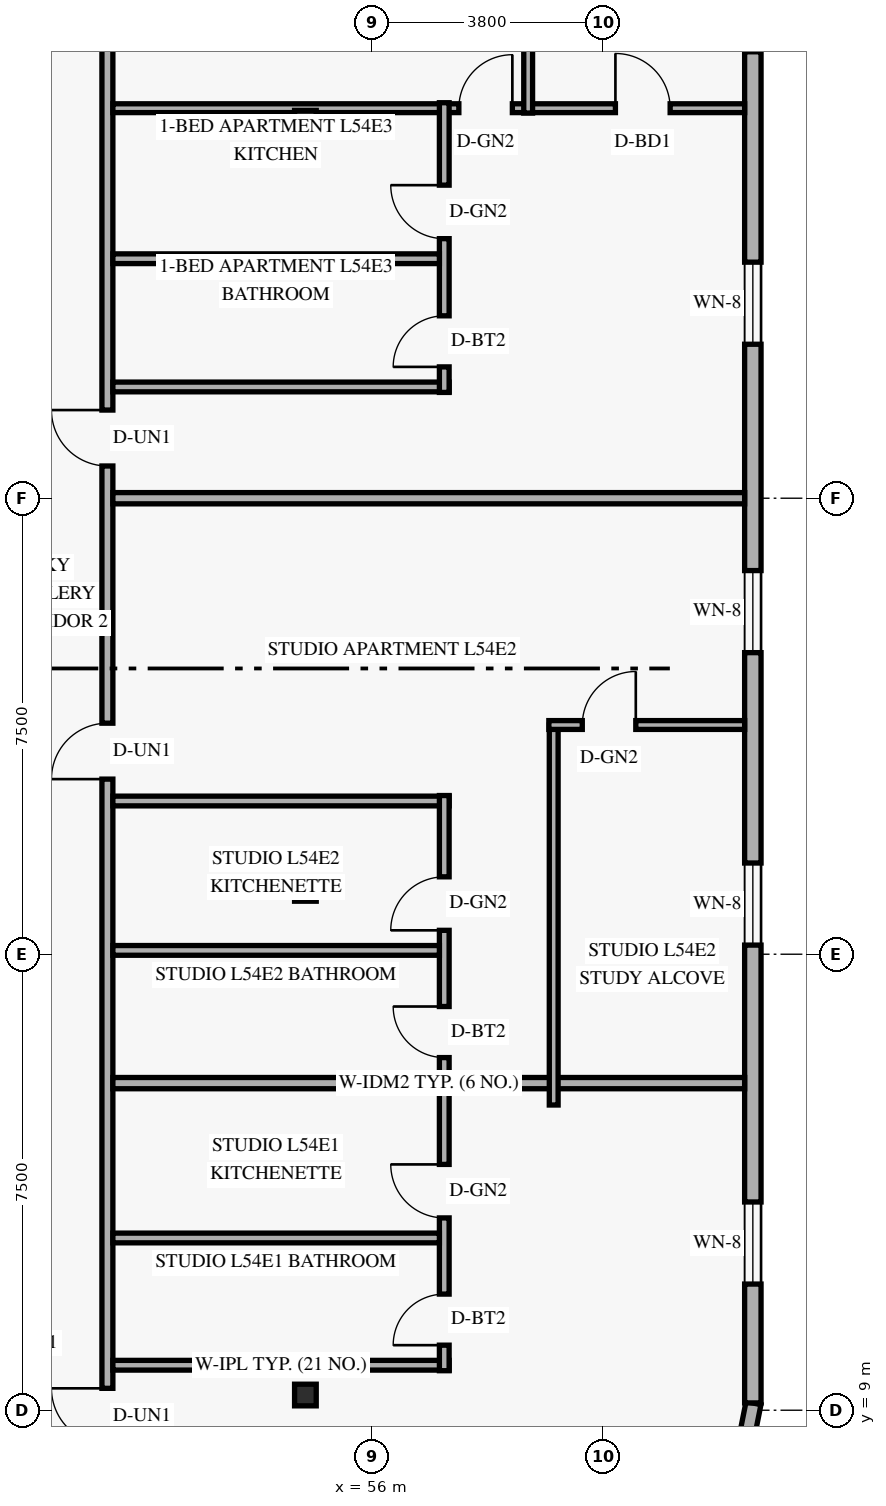
"""IFC4 building model, lengths in metres.
Left out: names, types, materials, properties, quantities, classifications, styles, units other than length and angle.
Written with IfcOpenShell. Run it as: python <this file> out.ifc"""

import sys

from ifc_helpers import new_model, si_unit, direction, frame, frame_2d, origin, origin_2d, place, context, subcontext, project, spatial, rectangle, hollow_rectangle, extrude, element, fill, save


model = new_model("IFC4")
c1 = context("Model", 3, precision=1e-05, world=origin(), true_north=direction((0.0, 1.0)))
c2 = subcontext(c1, "Body", "Model", "MODEL_VIEW")
j1 = project(units=[si_unit("LENGTHUNIT", "METRE"), si_unit("PLANEANGLEUNIT", "RADIAN")], contexts=[c1])
p1 = place(None, origin())
s1 = spatial("IfcSite", under=j1, at=p1, CompositionType="ELEMENT")
p2 = place(p1, origin())
s2 = spatial("IfcBuilding", under=s1, at=p2, CompositionType="ELEMENT")
p3 = place(p2, frame((0.0, 0.0, 209.4)))
s3 = spatial("IfcBuildingStorey", under=s2, at=p3, CompositionType="ELEMENT", Elevation=209.4)
for number, where, z_axis, x_axis in (
    (1, (54.802, 9.25, 0.0), (0.058, 0.0, 0.998), (0.0, 1.0, 0.0)),
    (2, (54.802, 17.55, 0.0), (0.058, 0.0, 0.998), (0.0, 1.0, 0.0)),
    (3, (54.802, 30.2, 0.0), (0.058, 0.0, 0.998), (0.0, 1.0, 0.0)),
):
    element("IfcColumn", number, at=place(p3, frame(where, z_axis=z_axis, x_axis=x_axis)), inside=s3, PredefinedType="COLUMN", context=c2, shape_type="SweptSolid", body=[
        extrude(hollow_rectangle(XDim=0.356, YDim=0.356, WallThickness=0.016, at=origin_2d()), origin(), (0.0, 0.0, 1.0), 3.606),
    ])
p4 = place(p3, frame((62.005, 7.754, 0.0), z_axis=(0.0, 0.0, 1.0), x_axis=(0.195135625965, 0.9807762678, 0.0)))
e4 = element("IfcWall", 4, at=p4, inside=s3, PredefinedType="SOLIDWALL", context=c2, shape_type="SweptSolid", body=[
    extrude(rectangle(XDim=1.389, YDim=0.25, at=frame_2d((0.694, 0.0))), origin(), (0.0, 0.0, 1.0), 3.36),
])
p5 = place(p3, frame((62.265, 9.12, 0.0), z_axis=(0.0, 0.0, 1.0), x_axis=(0.0, 1.0, 0.0)))
e5 = element("IfcWall", 5, at=p5, inside=s3, PredefinedType="SOLIDWALL", context=c2, shape_type="SweptSolid", body=[
    extrude(rectangle(XDim=29.76, YDim=0.27, at=frame_2d((14.88, 0.0))), origin(), (0.0, 0.0, 1.0), 3.36),
])
p6 = place(p5, frame((1.955, 0.0, 0.85)))
e6 = element("IfcOpeningElement", 6, at=p6, cuts=e5, PredefinedType="OPENING", context=c2, shape_type="SweptSolid", body=[
    extrude(rectangle(XDim=1.35, YDim=1.55, at=frame_2d((0.675, 0.775))), frame((0.0, 0.145, 0.0), z_axis=(0.0, -1.0, 0.0), x_axis=(1.0, 0.0, 0.0)), (0.0, 0.0, 1.0), 0.29),
])
p7 = place(p5, frame((7.53, 0.0, 0.85)))
e7 = element("IfcOpeningElement", 7, at=p7, cuts=e5, PredefinedType="OPENING", context=c2, shape_type="SweptSolid", body=[
    extrude(rectangle(XDim=1.35, YDim=1.55, at=frame_2d((0.675, 0.775))), frame((0.0, 0.145, 0.0), z_axis=(0.0, -1.0, 0.0), x_axis=(1.0, 0.0, 0.0)), (0.0, 0.0, 1.0), 0.29),
])
p8 = place(p5, frame((12.34, 0.0, 0.85)))
e8 = element("IfcOpeningElement", 8, at=p8, cuts=e5, PredefinedType="OPENING", context=c2, shape_type="SweptSolid", body=[
    extrude(rectangle(XDim=1.35, YDim=1.55, at=frame_2d((0.675, 0.775))), frame((0.0, 0.145, 0.0), z_axis=(0.0, -1.0, 0.0), x_axis=(1.0, 0.0, 0.0)), (0.0, 0.0, 1.0), 0.29),
])
p9 = place(p5, frame((17.412, 0.0, 0.85)))
e9 = element("IfcOpeningElement", 9, at=p9, cuts=e5, PredefinedType="OPENING", context=c2, shape_type="SweptSolid", body=[
    extrude(rectangle(XDim=1.35, YDim=1.55, at=frame_2d((0.675, 0.775))), frame((0.0, 0.145, 0.0), z_axis=(0.0, -1.0, 0.0), x_axis=(1.0, 0.0, 0.0)), (0.0, 0.0, 1.0), 0.29),
])
p10 = place(p5, frame((22.222, 0.0, 0.85)))
e10 = element("IfcOpeningElement", 10, at=p10, cuts=e5, PredefinedType="OPENING", context=c2, shape_type="SweptSolid", body=[
    extrude(rectangle(XDim=1.35, YDim=1.55, at=frame_2d((0.675, 0.775))), frame((0.0, 0.145, 0.0), z_axis=(0.0, -1.0, 0.0), x_axis=(1.0, 0.0, 0.0)), (0.0, 0.0, 1.0), 0.29),
])
p11 = place(p5, frame((26.455, 0.0, 0.85)))
e11 = element("IfcOpeningElement", 11, at=p11, cuts=e5, PredefinedType="OPENING", context=c2, shape_type="SweptSolid", body=[
    extrude(rectangle(XDim=1.35, YDim=1.55, at=frame_2d((0.675, 0.775))), frame((0.0, 0.145, 0.0), z_axis=(0.0, -1.0, 0.0), x_axis=(1.0, 0.0, 0.0)), (0.0, 0.0, 1.0), 0.29),
])
p12 = place(p3, frame((51.65, 5.77, 0.0), z_axis=(0.0, 0.0, 1.0), x_axis=(0.0, 1.0, 0.0)))
e12 = element("IfcWall", 12, at=p12, inside=s3, PredefinedType="STANDARD", context=c2, shape_type="SweptSolid", body=[
    extrude(rectangle(XDim=36.46, YDim=0.18, at=frame_2d((18.23, 0.0))), origin(), (0.0, 0.0, 1.0), 2.803),
])
p13 = place(p12, frame((2.67, 0.0, 0.0)))
e13 = element("IfcOpeningElement", 13, at=p13, cuts=e12, PredefinedType="OPENING", context=c2, shape_type="SweptSolid", body=[
    extrude(rectangle(XDim=0.92, YDim=2.15, at=frame_2d((0.46, 1.075))), frame((0.0, 0.1, 0.0), z_axis=(0.0, -1.0, 0.0), x_axis=(1.0, 0.0, 0.0)), (0.0, 0.0, 1.0), 0.2),
])
p14 = place(p12, frame((13.61, 0.0, 0.0)))
e14 = element("IfcOpeningElement", 14, at=p14, cuts=e12, PredefinedType="OPENING", context=c2, shape_type="SweptSolid", body=[
    extrude(rectangle(XDim=0.92, YDim=2.15, at=frame_2d((0.46, 1.075))), frame((0.0, 0.1, 0.0), z_axis=(0.0, -1.0, 0.0), x_axis=(1.0, 0.0, 0.0)), (0.0, 0.0, 1.0), 0.2),
])
p15 = place(p12, frame((18.76, 0.0, 0.0)))
e15 = element("IfcOpeningElement", 15, at=p15, cuts=e12, PredefinedType="OPENING", context=c2, shape_type="SweptSolid", body=[
    extrude(rectangle(XDim=0.92, YDim=2.15, at=frame_2d((0.46, 1.075))), frame((0.0, 0.1, 0.0), z_axis=(0.0, -1.0, 0.0), x_axis=(1.0, 0.0, 0.0)), (0.0, 0.0, 1.0), 0.2),
])
p16 = place(p12, frame((32.75, 0.0, 0.0)))
e16 = element("IfcOpeningElement", 16, at=p16, cuts=e12, PredefinedType="OPENING", context=c2, shape_type="SweptSolid", body=[
    extrude(rectangle(XDim=0.92, YDim=2.15, at=frame_2d((0.46, 1.075))), frame((0.0, 0.1, 0.0), z_axis=(0.0, -1.0, 0.0), x_axis=(1.0, 0.0, 0.0)), (0.0, 0.0, 1.0), 0.2),
])
p17 = place(p3, frame((51.74, 9.74, 0.0), z_axis=(0.0, 0.0, 1.0), x_axis=(1.0, 0.0, 0.0)))
e17 = element("IfcWall", 17, at=p17, inside=s3, PredefinedType="PLUMBINGWALL", context=c2, shape_type="SweptSolid", body=[
    extrude(rectangle(XDim=5.53, YDim=0.16, at=frame_2d((2.765, 0.0))), origin(), (0.0, 0.0, 1.0), 2.879),
])
p18 = place(p3, frame((57.19, 9.65, 0.0), z_axis=(0.0, 0.0, 1.0), x_axis=(0.0, 1.0, 0.0)))
e18 = element("IfcWall", 18, at=p18, inside=s3, PredefinedType="PLUMBINGWALL", context=c2, shape_type="SweptSolid", body=[
    extrude(rectangle(XDim=4.73, YDim=0.16, at=frame_2d((2.365, 0.0))), origin(), (0.0, 0.0, 1.0), 3.36),
])
p19 = place(p18, frame((0.42, 0.0, 0.0)))
e19 = element("IfcOpeningElement", 19, at=p19, cuts=e18, PredefinedType="OPENING", context=c2, shape_type="SweptSolid", body=[
    extrude(rectangle(XDim=0.84, YDim=2.12, at=frame_2d((0.42, 1.06))), frame((0.0, 0.09, 0.0), z_axis=(0.0, -1.0, 0.0), x_axis=(1.0, 0.0, 0.0)), (0.0, 0.0, 1.0), 0.18),
])
p20 = place(p18, frame((2.513, 0.0, 0.0)))
e20 = element("IfcOpeningElement", 20, at=p20, cuts=e18, PredefinedType="OPENING", context=c2, shape_type="SweptSolid", body=[
    extrude(rectangle(XDim=0.88, YDim=2.12, at=frame_2d((0.44, 1.06))), frame((0.0, 0.09, 0.0), z_axis=(0.0, -1.0, 0.0), x_axis=(1.0, 0.0, 0.0)), (0.0, 0.0, 1.0), 0.18),
])
p21 = place(p3, frame((51.74, 11.833, 0.0), z_axis=(0.0, 0.0, 1.0), x_axis=(1.0, 0.0, 0.0)))
e21 = element("IfcWall", 21, at=p21, inside=s3, PredefinedType="PLUMBINGWALL", context=c2, shape_type="SweptSolid", body=[
    extrude(rectangle(XDim=5.37, YDim=0.16, at=frame_2d((2.685, 0.0))), origin(), (0.0, 0.0, 1.0), 2.879),
])
p22 = place(p3, frame((51.74, 14.38, 0.0), z_axis=(0.0, 0.0, 1.0), x_axis=(1.0, 0.0, 0.0)))
e22 = element("IfcWall", 22, at=p22, inside=s3, PredefinedType="PARTITIONING", context=c2, shape_type="SweptSolid", body=[
    extrude(rectangle(XDim=10.39, YDim=0.185, at=frame_2d((5.195, 0.0))), origin(), (0.0, 0.0, 1.0), 2.879),
])
p23 = place(p3, frame((51.74, 19.02, 0.0), z_axis=(0.0, 0.0, 1.0), x_axis=(1.0, 0.0, 0.0)))
e23 = element("IfcWall", 23, at=p23, inside=s3, PredefinedType="PLUMBINGWALL", context=c2, shape_type="SweptSolid", body=[
    extrude(rectangle(XDim=5.53, YDim=0.16, at=frame_2d((2.765, 0.0))), origin(), (0.0, 0.0, 1.0), 2.879),
])
p24 = place(p3, frame((57.19, 14.472, 0.0), z_axis=(0.0, 0.0, 1.0), x_axis=(0.0, 1.0, 0.0)))
e24 = element("IfcWall", 24, at=p24, inside=s3, PredefinedType="PLUMBINGWALL", context=c2, shape_type="SweptSolid", body=[
    extrude(rectangle(XDim=4.638, YDim=0.16, at=frame_2d((2.319, 0.0))), origin(), (0.0, 0.0, 1.0), 3.36),
])
p25 = place(p24, frame((0.327, 0.0, 0.0)))
e25 = element("IfcOpeningElement", 25, at=p25, cuts=e24, PredefinedType="OPENING", context=c2, shape_type="SweptSolid", body=[
    extrude(rectangle(XDim=0.84, YDim=2.12, at=frame_2d((0.42, 1.06))), frame((0.0, 0.09, 0.0), z_axis=(0.0, -1.0, 0.0), x_axis=(1.0, 0.0, 0.0)), (0.0, 0.0, 1.0), 0.18),
])
p26 = place(p24, frame((2.42, 0.0, 0.0)))
e26 = element("IfcOpeningElement", 26, at=p26, cuts=e24, PredefinedType="OPENING", context=c2, shape_type="SweptSolid", body=[
    extrude(rectangle(XDim=0.88, YDim=2.12, at=frame_2d((0.44, 1.06))), frame((0.0, 0.09, 0.0), z_axis=(0.0, -1.0, 0.0), x_axis=(1.0, 0.0, 0.0)), (0.0, 0.0, 1.0), 0.18),
])
p27 = place(p3, frame((51.74, 16.563, 0.0), z_axis=(0.0, 0.0, 1.0), x_axis=(1.0, 0.0, 0.0)))
e27 = element("IfcWall", 27, at=p27, inside=s3, PredefinedType="PLUMBINGWALL", context=c2, shape_type="SweptSolid", body=[
    extrude(rectangle(XDim=5.37, YDim=0.16, at=frame_2d((2.685, 0.0))), origin(), (0.0, 0.0, 1.0), 2.879),
])
p28 = place(p3, frame((58.99, 14.02, 0.0), z_axis=(0.0, 0.0, 1.0), x_axis=(0.0, 1.0, 0.0)))
e28 = element("IfcWall", 28, at=p28, inside=s3, PredefinedType="PARTITIONING", context=c2, shape_type="SweptSolid", body=[
    extrude(rectangle(XDim=6.25, YDim=0.145, at=frame_2d((3.125, 0.0))), origin(), (0.0, 0.0, 1.0), 3.36),
])
p29 = place(p3, frame((58.91, 20.27, 0.0), z_axis=(0.0, 0.0, 1.0), x_axis=(1.0, 0.0, 0.0)))
e29 = element("IfcWall", 29, at=p29, inside=s3, PredefinedType="PARTITIONING", context=c2, shape_type="SweptSolid", body=[
    extrude(rectangle(XDim=3.22, YDim=0.145, at=frame_2d((1.61, 0.0))), origin(), (0.0, 0.0, 1.0), 3.36),
])
p30 = place(p29, frame((0.55, 0.0, 0.0)))
e30 = element("IfcOpeningElement", 30, at=p30, cuts=e29, PredefinedType="OPENING", context=c2, shape_type="SweptSolid", body=[
    extrude(rectangle(XDim=0.88, YDim=2.12, at=frame_2d((0.44, 1.06))), frame((0.0, 0.083, 0.0), z_axis=(0.0, -1.0, 0.0), x_axis=(1.0, 0.0, 0.0)), (0.0, 0.0, 1.0), 0.165),
])
p31 = place(p3, frame((51.74, 24.0, 0.0), z_axis=(0.0, 0.0, 1.0), x_axis=(1.0, 0.0, 0.0)))
e31 = element("IfcWall", 31, at=p31, inside=s3, PredefinedType="PARTITIONING", context=c2, shape_type="SweptSolid", body=[
    extrude(rectangle(XDim=10.39, YDim=0.185, at=frame_2d((5.195, 0.0))), origin(), (0.0, 0.0, 1.0), 2.879),
])
p32 = place(p3, frame((51.74, 30.415, 0.0), z_axis=(0.0, 0.0, 1.0), x_axis=(1.0, 0.0, 0.0)))
e32 = element("IfcWall", 32, at=p32, inside=s3, PredefinedType="PARTITIONING", context=c2, shape_type="SweptSolid", body=[
    extrude(rectangle(XDim=10.39, YDim=0.145, at=frame_2d((5.195, 0.0))), origin(), (0.0, 0.0, 1.0), 2.879),
])
p33 = place(p32, frame((5.69, 0.0, 0.0)))
e33 = element("IfcOpeningElement", 33, at=p33, cuts=e32, PredefinedType="OPENING", context=c2, shape_type="SweptSolid", body=[
    extrude(rectangle(XDim=0.88, YDim=2.12, at=frame_2d((0.44, 1.06))), frame((0.0, 0.083, 0.0), z_axis=(0.0, -1.0, 0.0), x_axis=(1.0, 0.0, 0.0)), (0.0, 0.0, 1.0), 0.165),
])
p34 = place(p32, frame((8.265, 0.0, 0.0)))
e34 = element("IfcOpeningElement", 34, at=p34, cuts=e32, PredefinedType="OPENING", context=c2, shape_type="SweptSolid", body=[
    extrude(rectangle(XDim=0.9, YDim=2.14, at=frame_2d((0.45, 1.07))), frame((0.0, 0.083, 0.0), z_axis=(0.0, -1.0, 0.0), x_axis=(1.0, 0.0, 0.0)), (0.0, 0.0, 1.0), 0.165),
])
p35 = place(p3, frame((51.74, 25.83, 0.0), z_axis=(0.0, 0.0, 1.0), x_axis=(1.0, 0.0, 0.0)))
e35 = element("IfcWall", 35, at=p35, inside=s3, PredefinedType="PLUMBINGWALL", context=c2, shape_type="SweptSolid", body=[
    extrude(rectangle(XDim=5.53, YDim=0.16, at=frame_2d((2.765, 0.0))), origin(), (0.0, 0.0, 1.0), 2.879),
])
p36 = place(p3, frame((57.19, 25.74, 0.0), z_axis=(0.0, 0.0, 1.0), x_axis=(0.0, 1.0, 0.0)))
e36 = element("IfcWall", 36, at=p36, inside=s3, PredefinedType="PLUMBINGWALL", context=c2, shape_type="SweptSolid", body=[
    extrude(rectangle(XDim=4.765, YDim=0.16, at=frame_2d((2.382, 0.0))), origin(), (0.0, 0.0, 1.0), 3.36),
])
p37 = place(p36, frame((0.42, 0.0, 0.0)))
e37 = element("IfcOpeningElement", 37, at=p37, cuts=e36, PredefinedType="OPENING", context=c2, shape_type="SweptSolid", body=[
    extrude(rectangle(XDim=0.84, YDim=2.12, at=frame_2d((0.42, 1.06))), frame((0.0, 0.09, 0.0), z_axis=(0.0, -1.0, 0.0), x_axis=(1.0, 0.0, 0.0)), (0.0, 0.0, 1.0), 0.18),
])
p38 = place(p36, frame((2.529, 0.0, 0.0)))
e38 = element("IfcOpeningElement", 38, at=p38, cuts=e36, PredefinedType="OPENING", context=c2, shape_type="SweptSolid", body=[
    extrude(rectangle(XDim=0.88, YDim=2.12, at=frame_2d((0.44, 1.06))), frame((0.0, 0.09, 0.0), z_axis=(0.0, -1.0, 0.0), x_axis=(1.0, 0.0, 0.0)), (0.0, 0.0, 1.0), 0.18),
])
p39 = place(p3, frame((51.74, 27.939, 0.0), z_axis=(0.0, 0.0, 1.0), x_axis=(1.0, 0.0, 0.0)))
e39 = element("IfcWall", 39, at=p39, inside=s3, PredefinedType="PLUMBINGWALL", context=c2, shape_type="SweptSolid", body=[
    extrude(rectangle(XDim=5.37, YDim=0.16, at=frame_2d((2.685, 0.0))), origin(), (0.0, 0.0, 1.0), 2.879),
])
p40 = place(p3, frame((58.57, 30.335, 0.0), z_axis=(0.0, 0.0, 1.0), x_axis=(0.0, 1.0, 0.0)))
e40 = element("IfcWall", 40, at=p40, inside=s3, PredefinedType="PARTITIONING", context=c2, shape_type="SweptSolid", body=[
    extrude(rectangle(XDim=3.675, YDim=0.145, at=frame_2d((1.838, 0.0))), origin(), (0.0, 0.0, 1.0), 3.36),
])
p41 = place(p6, origin())
e41 = element("IfcWindow", 41, at=p41, inside=s3, PartitioningType="SINGLE_PANEL", PredefinedType="WINDOW", context=c2, shape_type="SweptSolid", body=[
    extrude(rectangle(XDim=1.35, YDim=1.55, at=frame_2d((0.675, 0.775))), frame((0.0, 0.03, 0.0), z_axis=(0.0, -1.0, 0.0), x_axis=(1.0, 0.0, 0.0)), (0.0, 0.0, 1.0), 0.06),
])
fill(e6, e41)
p42 = place(p7, origin())
e42 = element("IfcWindow", 42, at=p42, inside=s3, PartitioningType="SINGLE_PANEL", PredefinedType="WINDOW", context=c2, shape_type="SweptSolid", body=[
    extrude(rectangle(XDim=1.35, YDim=1.55, at=frame_2d((0.675, 0.775))), frame((0.0, 0.03, 0.0), z_axis=(0.0, -1.0, 0.0), x_axis=(1.0, 0.0, 0.0)), (0.0, 0.0, 1.0), 0.06),
])
fill(e7, e42)
p43 = place(p8, origin())
e43 = element("IfcWindow", 43, at=p43, inside=s3, PartitioningType="SINGLE_PANEL", PredefinedType="WINDOW", context=c2, shape_type="SweptSolid", body=[
    extrude(rectangle(XDim=1.35, YDim=1.55, at=frame_2d((0.675, 0.775))), frame((0.0, 0.03, 0.0), z_axis=(0.0, -1.0, 0.0), x_axis=(1.0, 0.0, 0.0)), (0.0, 0.0, 1.0), 0.06),
])
fill(e8, e43)
p44 = place(p9, origin())
e44 = element("IfcWindow", 44, at=p44, inside=s3, PartitioningType="SINGLE_PANEL", PredefinedType="WINDOW", context=c2, shape_type="SweptSolid", body=[
    extrude(rectangle(XDim=1.35, YDim=1.55, at=frame_2d((0.675, 0.775))), frame((0.0, 0.03, 0.0), z_axis=(0.0, -1.0, 0.0), x_axis=(1.0, 0.0, 0.0)), (0.0, 0.0, 1.0), 0.06),
])
fill(e9, e44)
p45 = place(p13, origin())
e45 = element("IfcDoor", 45, at=p45, inside=s3, OperationType="SINGLE_SWING_RIGHT", PredefinedType="DOOR", context=c2, shape_type="SweptSolid", body=[
    extrude(rectangle(XDim=0.92, YDim=2.15, at=frame_2d((0.46, 1.075))), frame((0.0, 0.025, 0.0), z_axis=(0.0, -1.0, 0.0), x_axis=(1.0, 0.0, 0.0)), (0.0, 0.0, 1.0), 0.05),
])
fill(e13, e45)
p46 = place(p19, origin())
e46 = element("IfcDoor", 46, at=p46, inside=s3, OperationType="SINGLE_SWING_LEFT", PredefinedType="DOOR", context=c2, shape_type="SweptSolid", body=[
    extrude(rectangle(XDim=0.84, YDim=2.12, at=frame_2d((0.42, 1.06))), frame((0.0, 0.025, 0.0), z_axis=(0.0, -1.0, 0.0), x_axis=(1.0, 0.0, 0.0)), (0.0, 0.0, 1.0), 0.05),
])
fill(e19, e46)
p47 = place(p20, origin())
e47 = element("IfcDoor", 47, at=p47, inside=s3, OperationType="SINGLE_SWING_RIGHT", PredefinedType="DOOR", context=c2, shape_type="SweptSolid", body=[
    extrude(rectangle(XDim=0.88, YDim=2.12, at=frame_2d((0.44, 1.06))), frame((0.0, 0.025, 0.0), z_axis=(0.0, -1.0, 0.0), x_axis=(1.0, 0.0, 0.0)), (0.0, 0.0, 1.0), 0.05),
])
fill(e20, e47)
p48 = place(p30, origin())
e48 = element("IfcDoor", 48, at=p48, inside=s3, OperationType="SINGLE_SWING_RIGHT", PredefinedType="DOOR", context=c2, shape_type="SweptSolid", body=[
    extrude(rectangle(XDim=0.88, YDim=2.12, at=frame_2d((0.44, 1.06))), frame((0.0, 0.025, 0.0), z_axis=(0.0, -1.0, 0.0), x_axis=(1.0, 0.0, 0.0)), (0.0, 0.0, 1.0), 0.05),
])
fill(e30, e48)
p49 = place(p14, origin())
e49 = element("IfcDoor", 49, at=p49, inside=s3, OperationType="SINGLE_SWING_LEFT", PredefinedType="DOOR", context=c2, shape_type="SweptSolid", body=[
    extrude(rectangle(XDim=0.92, YDim=2.15, at=frame_2d((0.46, 1.075))), frame((0.0, 0.025, 0.0), z_axis=(0.0, -1.0, 0.0), x_axis=(1.0, 0.0, 0.0)), (0.0, 0.0, 1.0), 0.05),
])
fill(e14, e49)
p50 = place(p25, origin())
e50 = element("IfcDoor", 50, at=p50, inside=s3, OperationType="SINGLE_SWING_RIGHT", PredefinedType="DOOR", context=c2, shape_type="SweptSolid", body=[
    extrude(rectangle(XDim=0.84, YDim=2.12, at=frame_2d((0.42, 1.06))), frame((0.0, 0.025, 0.0), z_axis=(0.0, -1.0, 0.0), x_axis=(1.0, 0.0, 0.0)), (0.0, 0.0, 1.0), 0.05),
])
fill(e25, e50)
p51 = place(p26, origin())
e51 = element("IfcDoor", 51, at=p51, inside=s3, OperationType="SINGLE_SWING_LEFT", PredefinedType="DOOR", context=c2, shape_type="SweptSolid", body=[
    extrude(rectangle(XDim=0.88, YDim=2.12, at=frame_2d((0.44, 1.06))), frame((0.0, 0.025, 0.0), z_axis=(0.0, -1.0, 0.0), x_axis=(1.0, 0.0, 0.0)), (0.0, 0.0, 1.0), 0.05),
])
fill(e26, e51)
p52 = place(p15, origin())
e52 = element("IfcDoor", 52, at=p52, inside=s3, OperationType="SINGLE_SWING_RIGHT", PredefinedType="DOOR", context=c2, shape_type="SweptSolid", body=[
    extrude(rectangle(XDim=0.92, YDim=2.15, at=frame_2d((0.46, 1.075))), frame((0.0, 0.025, 0.0), z_axis=(0.0, -1.0, 0.0), x_axis=(1.0, 0.0, 0.0)), (0.0, 0.0, 1.0), 0.05),
])
fill(e15, e52)
p53 = place(p37, origin())
e53 = element("IfcDoor", 53, at=p53, inside=s3, OperationType="SINGLE_SWING_LEFT", PredefinedType="DOOR", context=c2, shape_type="SweptSolid", body=[
    extrude(rectangle(XDim=0.84, YDim=2.12, at=frame_2d((0.42, 1.06))), frame((0.0, 0.025, 0.0), z_axis=(0.0, -1.0, 0.0), x_axis=(1.0, 0.0, 0.0)), (0.0, 0.0, 1.0), 0.05),
])
fill(e37, e53)
p54 = place(p38, origin())
e54 = element("IfcDoor", 54, at=p54, inside=s3, OperationType="SINGLE_SWING_RIGHT", PredefinedType="DOOR", context=c2, shape_type="SweptSolid", body=[
    extrude(rectangle(XDim=0.88, YDim=2.12, at=frame_2d((0.44, 1.06))), frame((0.0, 0.025, 0.0), z_axis=(0.0, -1.0, 0.0), x_axis=(1.0, 0.0, 0.0)), (0.0, 0.0, 1.0), 0.05),
])
fill(e38, e54)
p55 = place(p33, origin())
e55 = element("IfcDoor", 55, at=p55, inside=s3, OperationType="SINGLE_SWING_RIGHT", PredefinedType="DOOR", context=c2, shape_type="SweptSolid", body=[
    extrude(rectangle(XDim=0.88, YDim=2.12, at=frame_2d((0.44, 1.06))), frame((0.0, 0.025, 0.0), z_axis=(0.0, -1.0, 0.0), x_axis=(1.0, 0.0, 0.0)), (0.0, 0.0, 1.0), 0.05),
])
fill(e33, e55)
p56 = place(p34, origin())
e56 = element("IfcDoor", 56, at=p56, inside=s3, OperationType="SINGLE_SWING_LEFT", PredefinedType="DOOR", context=c2, shape_type="SweptSolid", body=[
    extrude(rectangle(XDim=0.9, YDim=2.14, at=frame_2d((0.45, 1.07))), frame((0.0, 0.025, 0.0), z_axis=(0.0, -1.0, 0.0), x_axis=(1.0, 0.0, 0.0)), (0.0, 0.0, 1.0), 0.05),
])
fill(e34, e56)
save(model, sys.argv[1])
